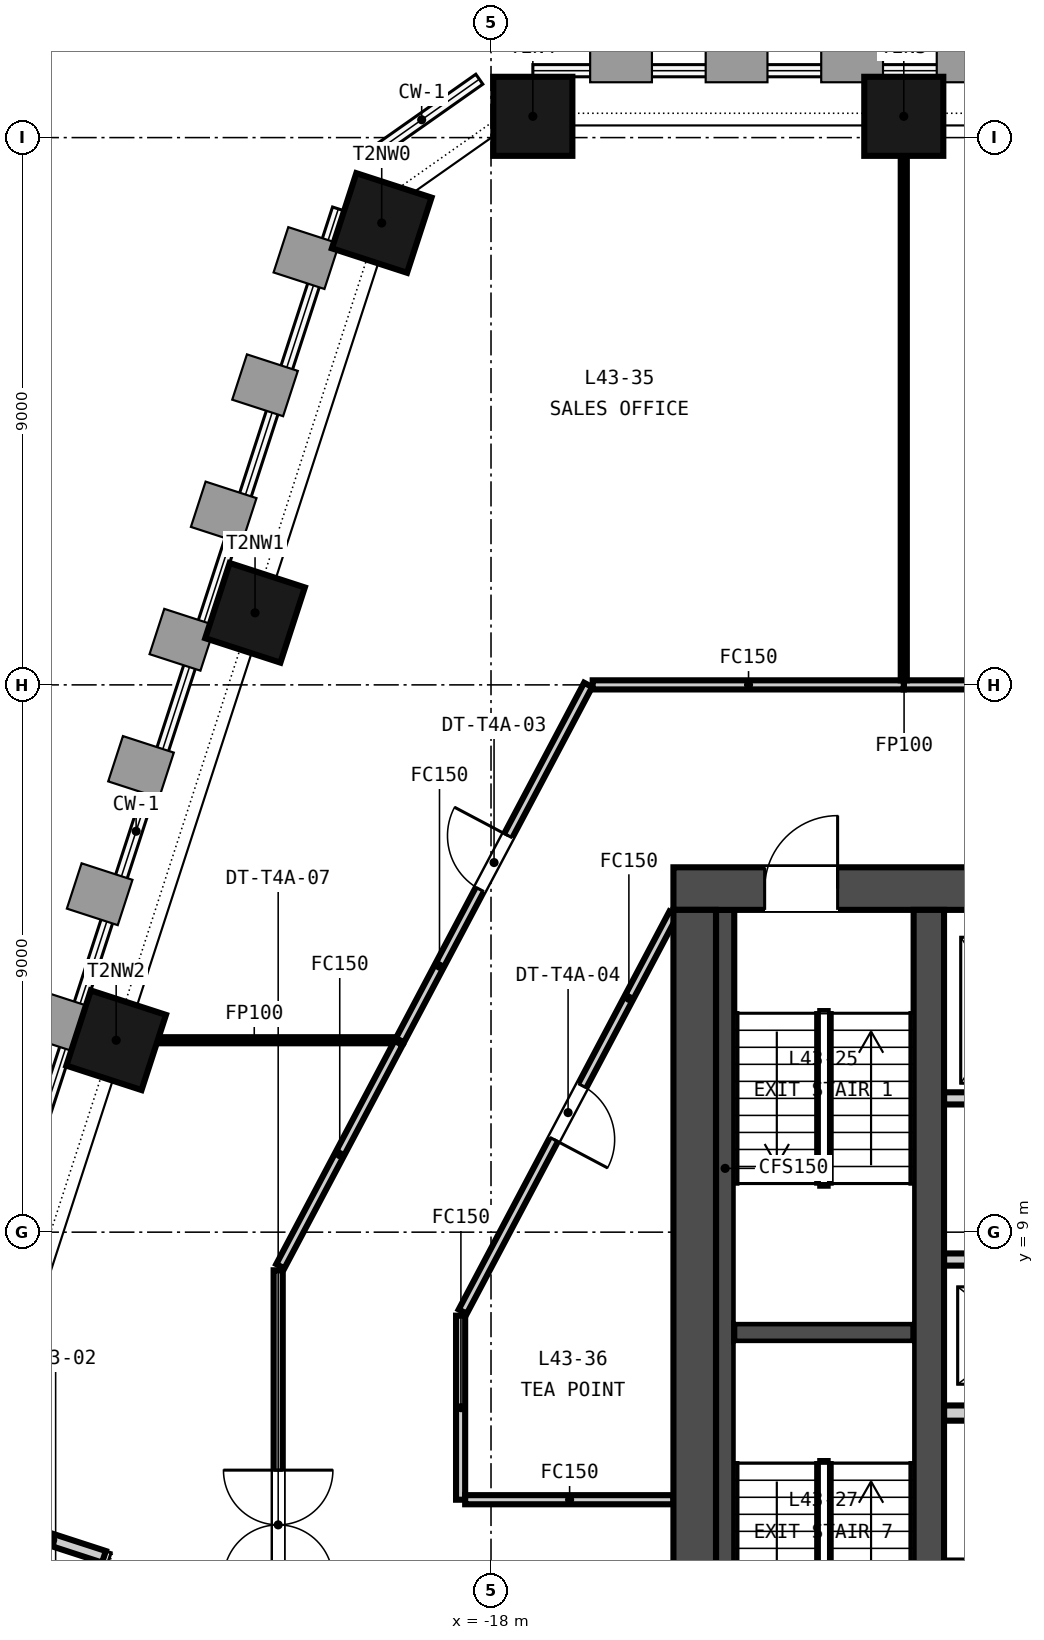
"""IFC4 building model, lengths in metres.
Left out: names, types, materials, properties, quantities, classifications, styles, units other than length and angle.
Written with IfcOpenShell. Run it as: python <this file> out.ifc"""

import sys

from ifc_helpers import new_model, si_unit, direction, frame, frame_2d, origin, origin_2d, place, context, subcontext, project, spatial, rectangle, extrude, element, fill, save


model = new_model("IFC4")
c1 = context("Model", 3, precision=1e-05, world=origin(), true_north=direction((0.0, 1.0)))
c2 = subcontext(c1, "Body", "Model", "MODEL_VIEW")
j1 = project(units=[si_unit("LENGTHUNIT", "METRE"), si_unit("PLANEANGLEUNIT", "RADIAN")], contexts=[c1])
p1 = place(None, origin())
s1 = spatial("IfcSite", under=j1, at=p1, CompositionType="ELEMENT")
p2 = place(p1, origin())
s2 = spatial("IfcBuilding", under=s1, at=p2, CompositionType="ELEMENT")
p3 = place(p2, frame((0.0, 0.0, 174.45)))
s3 = spatial("IfcBuildingStorey", under=s2, at=p3, CompositionType="ELEMENT", Elevation=174.45)
p4 = place(p3, frame((-15.0, 14.65, -0.15), z_axis=(0.0, 0.0, 1.0), x_axis=(1.0, 0.0, 0.0)))
e1 = element("IfcWall", 1, at=p4, inside=s3, PredefinedType="SOLIDWALL", context=c2, shape_type="SweptSolid", body=[
    extrude(rectangle(XDim=30.0, YDim=0.7, at=frame_2d((15.0, 0.0))), origin(), (0.0, 0.0, 1.0), 3.65),
])
p5 = place(p4, frame((9.25, 0.0, 0.15)))
e2 = element("IfcOpeningElement", 2, at=p5, cuts=e1, PredefinedType="OPENING", context=c2, shape_type="SweptSolid", body=[
    extrude(rectangle(XDim=1.5, YDim=2.1, at=frame_2d((0.75, 1.05))), frame((0.0, 0.36, 0.0), z_axis=(0.0, -1.0, 0.0), x_axis=(1.0, 0.0, 0.0)), (0.0, 0.0, 1.0), 0.72),
])
p6 = place(p4, frame((19.4, 0.0, 0.15)))
e3 = element("IfcOpeningElement", 3, at=p6, cuts=e1, PredefinedType="OPENING", context=c2, shape_type="SweptSolid", body=[
    extrude(rectangle(XDim=1.5, YDim=2.1, at=frame_2d((0.75, 1.05))), frame((0.0, 0.36, 0.0), z_axis=(0.0, -1.0, 0.0), x_axis=(1.0, 0.0, 0.0)), (0.0, 0.0, 1.0), 0.72),
])
p7 = place(p4, frame((1.5, 0.0, 0.15)))
e4 = element("IfcOpeningElement", 4, at=p7, cuts=e1, PredefinedType="OPENING", context=c2, shape_type="SweptSolid", body=[
    extrude(rectangle(XDim=1.2, YDim=2.1, at=frame_2d((0.6, 1.05))), frame((0.0, 0.36, 0.0), z_axis=(0.0, -1.0, 0.0), x_axis=(1.0, 0.0, 0.0)), (0.0, 0.0, 1.0), 0.72),
])
p8 = place(p4, frame((27.3, 0.0, 0.15)))
e5 = element("IfcOpeningElement", 5, at=p8, cuts=e1, PredefinedType="OPENING", context=c2, shape_type="SweptSolid", body=[
    extrude(rectangle(XDim=1.2, YDim=2.1, at=frame_2d((0.6, 1.05))), frame((0.0, 0.36, 0.0), z_axis=(0.0, -1.0, 0.0), x_axis=(1.0, 0.0, 0.0)), (0.0, 0.0, 1.0), 0.72),
])
p9 = place(p3, frame((-14.65, 0.7, -0.15), z_axis=(0.0, 0.0, 1.0), x_axis=(0.0, 1.0, 0.0)))
e6 = element("IfcWall", 6, at=p9, inside=s3, PredefinedType="SOLIDWALL", context=c2, shape_type="SweptSolid", body=[
    extrude(rectangle(XDim=13.6, YDim=0.7, at=frame_2d((6.8, 0.0))), origin(), (0.0, 0.0, 1.0), 3.65),
])
p10 = place(p3, frame((-10.8, 0.7, -0.15), z_axis=(0.0, 0.0, 1.0), x_axis=(0.0, 1.0, 0.0)))
e7 = element("IfcWall", 7, at=p10, inside=s3, PredefinedType="SOLIDWALL", context=c2, shape_type="SweptSolid", body=[
    extrude(rectangle(XDim=13.6, YDim=0.5, at=frame_2d((6.8, 0.0))), origin(), (0.0, 0.0, 1.0), 3.65),
])
for number, where, z_axis, x_axis in (
    (8, (-11.212, 27.35, -0.15), (0.0, 0.0, 1.0), (-1.0, 0.0, 0.0)),
    (9, (-17.312, 27.35, -0.15), (0.0, 0.0, 1.0), (-1.0, 0.0, 0.0)),
    (10, (-19.798, 25.596, -0.15), (0.0, 0.0, 1.0), (-0.309, -0.951, 0.0)),
    (11, (-21.881, 19.185, -0.15), (0.0, 0.0, 1.0), (-0.309, -0.951, 0.0)),
    (12, (-24.164, 12.156, -0.15), (0.0, 0.0, 1.0), (-0.309, -0.951, 0.0)),
):
    element("IfcColumn", number, at=place(p3, frame(where, z_axis=z_axis, x_axis=x_axis)), inside=s3, PredefinedType="COLUMN", context=c2, shape_type="SweptSolid", body=[
        extrude(rectangle(XDim=1.3, YDim=1.3, at=origin_2d()), origin(), (0.0, 0.0, 1.0), 3.65),
    ])
p11 = place(p3, frame((-26.062, 4.213, 0.0), z_axis=(0.0, 0.0, 1.0), x_axis=(0.951051165303, -0.309033462549, 0.0)))
e13 = element("IfcWall", 13, at=p11, inside=s3, PredefinedType="SOLIDWALL", context=c2, shape_type="SweptSolid", body=[
    extrude(rectangle(XDim=1.784, YDim=0.2, at=frame_2d((0.892, 0.0))), origin(), (0.0, 0.0, 1.0), 3.05),
])
p12 = place(p3, frame((-10.55, 6.025, 0.0), z_axis=(0.0, 0.0, 1.0), x_axis=(1.0, 0.0, 0.0)))
e14 = element("IfcWall", 14, at=p12, inside=s3, PredefinedType="PARTITIONING", context=c2, shape_type="SweptSolid", body=[
    extrude(rectangle(XDim=21.1, YDim=0.25, at=frame_2d((10.55, 0.0))), origin(), (0.0, 0.0, 1.0), 3.5),
])
p13 = place(p3, frame((-10.55, 8.55, 0.0), z_axis=(0.0, 0.0, 1.0), x_axis=(1.0, 0.0, 0.0)))
e15 = element("IfcWall", 15, at=p13, inside=s3, PredefinedType="PARTITIONING", context=c2, shape_type="SweptSolid", body=[
    extrude(rectangle(XDim=21.1, YDim=0.2, at=frame_2d((10.55, 0.0))), origin(), (0.0, 0.0, 1.0), 3.5),
])
p14 = place(p13, frame((0.675, 0.0, 0.0)))
e16 = element("IfcOpeningElement", 16, at=p14, cuts=e15, PredefinedType="OPENING", context=c2, shape_type="SweptSolid", body=[
    extrude(rectangle(XDim=1.2, YDim=2.1, at=frame_2d((0.6, 1.05))), frame((0.0, 0.11, 0.0), z_axis=(0.0, -1.0, 0.0), x_axis=(1.0, 0.0, 0.0)), (0.0, 0.0, 1.0), 0.22),
])
p15 = place(p13, frame((3.475, 0.0, 0.0)))
e17 = element("IfcOpeningElement", 17, at=p15, cuts=e15, PredefinedType="OPENING", context=c2, shape_type="SweptSolid", body=[
    extrude(rectangle(XDim=1.2, YDim=2.1, at=frame_2d((0.6, 1.05))), frame((0.0, 0.11, 0.0), z_axis=(0.0, -1.0, 0.0), x_axis=(1.0, 0.0, 0.0)), (0.0, 0.0, 1.0), 0.22),
])
p16 = place(p13, frame((6.275, 0.0, 0.0)))
e18 = element("IfcOpeningElement", 18, at=p16, cuts=e15, PredefinedType="OPENING", context=c2, shape_type="SweptSolid", body=[
    extrude(rectangle(XDim=1.2, YDim=2.1, at=frame_2d((0.6, 1.05))), frame((0.0, 0.11, 0.0), z_axis=(0.0, -1.0, 0.0), x_axis=(1.0, 0.0, 0.0)), (0.0, 0.0, 1.0), 0.22),
])
p17 = place(p13, frame((9.075, 0.0, 0.0)))
e19 = element("IfcOpeningElement", 19, at=p17, cuts=e15, PredefinedType="OPENING", context=c2, shape_type="SweptSolid", body=[
    extrude(rectangle(XDim=1.2, YDim=2.1, at=frame_2d((0.6, 1.05))), frame((0.0, 0.11, 0.0), z_axis=(0.0, -1.0, 0.0), x_axis=(1.0, 0.0, 0.0)), (0.0, 0.0, 1.0), 0.22),
])
p18 = place(p13, frame((11.875, 0.0, 0.0)))
e20 = element("IfcOpeningElement", 20, at=p18, cuts=e15, PredefinedType="OPENING", context=c2, shape_type="SweptSolid", body=[
    extrude(rectangle(XDim=1.2, YDim=2.1, at=frame_2d((0.6, 1.05))), frame((0.0, 0.11, 0.0), z_axis=(0.0, -1.0, 0.0), x_axis=(1.0, 0.0, 0.0)), (0.0, 0.0, 1.0), 0.22),
])
p19 = place(p13, frame((14.675, 0.0, 0.0)))
e21 = element("IfcOpeningElement", 21, at=p19, cuts=e15, PredefinedType="OPENING", context=c2, shape_type="SweptSolid", body=[
    extrude(rectangle(XDim=1.2, YDim=2.1, at=frame_2d((0.6, 1.05))), frame((0.0, 0.11, 0.0), z_axis=(0.0, -1.0, 0.0), x_axis=(1.0, 0.0, 0.0)), (0.0, 0.0, 1.0), 0.22),
])
p20 = place(p13, frame((17.475, 0.0, 0.0)))
e22 = element("IfcOpeningElement", 22, at=p20, cuts=e15, PredefinedType="OPENING", context=c2, shape_type="SweptSolid", body=[
    extrude(rectangle(XDim=1.2, YDim=2.1, at=frame_2d((0.6, 1.05))), frame((0.0, 0.11, 0.0), z_axis=(0.0, -1.0, 0.0), x_axis=(1.0, 0.0, 0.0)), (0.0, 0.0, 1.0), 0.22),
])
p21 = place(p13, frame((19.9, 0.0, 0.0)))
e23 = element("IfcOpeningElement", 23, at=p21, cuts=e15, PredefinedType="OPENING", context=c2, shape_type="SweptSolid", body=[
    extrude(rectangle(XDim=0.9, YDim=2.1, at=frame_2d((0.45, 1.05))), frame((0.0, 0.11, 0.0), z_axis=(0.0, -1.0, 0.0), x_axis=(1.0, 0.0, 0.0)), (0.0, 0.0, 1.0), 0.22),
])
p22 = place(p3, frame((-10.55, 11.2, 0.0), z_axis=(0.0, 0.0, 1.0), x_axis=(1.0, 0.0, 0.0)))
e24 = element("IfcWall", 24, at=p22, inside=s3, PredefinedType="PARTITIONING", context=c2, shape_type="SweptSolid", body=[
    extrude(rectangle(XDim=4.8, YDim=0.2, at=frame_2d((2.4, 0.0))), origin(), (0.0, 0.0, 1.0), 3.5),
])
p23 = place(p22, frame((0.525, 0.0, 0.0)))
e25 = element("IfcOpeningElement", 25, at=p23, cuts=e24, PredefinedType="OPENING", context=c2, shape_type="SweptSolid", body=[
    extrude(rectangle(XDim=1.1, YDim=2.1, at=frame_2d((0.55, 1.05))), frame((0.0, 0.11, 0.0), z_axis=(0.0, -1.0, 0.0), x_axis=(1.0, 0.0, 0.0)), (0.0, 0.0, 1.0), 0.22),
])
p24 = place(p22, frame((2.925, 0.0, 0.0)))
e26 = element("IfcOpeningElement", 26, at=p24, cuts=e24, PredefinedType="OPENING", context=c2, shape_type="SweptSolid", body=[
    extrude(rectangle(XDim=1.1, YDim=2.1, at=frame_2d((0.55, 1.05))), frame((0.0, 0.11, 0.0), z_axis=(0.0, -1.0, 0.0), x_axis=(1.0, 0.0, 0.0)), (0.0, 0.0, 1.0), 0.22),
])
p25 = place(p3, frame((-14.0, 7.35, 0.0), z_axis=(0.0, 0.0, 1.0), x_axis=(1.0, 0.0, 0.0)))
e27 = element("IfcWall", 27, at=p25, inside=s3, PredefinedType="SOLIDWALL", context=c2, shape_type="SweptSolid", body=[
    extrude(rectangle(XDim=2.95, YDim=0.3, at=frame_2d((1.475, 0.0))), origin(), (0.0, 0.0, 1.0), 3.5),
])
p26 = place(p3, frame((-14.15, 0.7, 0.0), z_axis=(0.0, 0.0, 1.0), x_axis=(0.0, 1.0, 0.0)))
e28 = element("IfcWall", 28, at=p26, inside=s3, PredefinedType="SOLIDWALL", context=c2, shape_type="SweptSolid", body=[
    extrude(rectangle(XDim=13.6, YDim=0.3, at=frame_2d((6.8, 0.0))), origin(), (0.0, 0.0, 1.0), 3.5),
])
p27 = place(p3, frame((-18.5, 7.627, 0.0), z_axis=(0.0, 0.0, 1.0), x_axis=(0.0, -1.0, 0.0)))
e29 = element("IfcWall", 29, at=p27, inside=s3, PredefinedType="PARTITIONING", context=c2, shape_type="SweptSolid", body=[
    extrude(rectangle(XDim=3.027, YDim=0.15, at=frame_2d((1.513, 0.0))), origin(), (0.0, 0.0, 1.0), 2.741),
])
p28 = place(p3, frame((-15.0, 14.239, 0.0), z_axis=(0.0, 0.0, 1.0), x_axis=(-0.467834708812, -0.88381597928, 0.0)))
e30 = element("IfcWall", 30, at=p28, inside=s3, PredefinedType="PARTITIONING", context=c2, shape_type="SweptSolid", body=[
    extrude(rectangle(XDim=7.406, YDim=0.15, at=frame_2d((3.703, 0.0))), origin(), (0.0, 0.0, 1.0), 2.741),
])
p29 = place(p28, frame((3.203, 0.0, 0.0)))
e31 = element("IfcOpeningElement", 31, at=p29, cuts=e30, PredefinedType="OPENING", context=c2, shape_type="SweptSolid", body=[
    extrude(rectangle(XDim=1.0, YDim=2.1, at=frame_2d((0.5, 1.05))), frame((0.0, 0.085, 0.0), z_axis=(0.0, -1.0, 0.0), x_axis=(1.0, 0.0, 0.0)), (0.0, 0.0, 1.0), 0.17),
])
p30 = place(p3, frame((-11.212, 18.0, 0.0), z_axis=(0.0, 0.0, 1.0), x_axis=(1.0, 0.0, 0.0)))
e32 = element("IfcWall", 32, at=p30, inside=s3, PredefinedType="PARTITIONING", context=c2, shape_type="SweptSolid", body=[
    extrude(rectangle(XDim=13.712, YDim=0.15, at=frame_2d((6.856, 0.0))), origin(), (0.0, 0.0, 1.0), 2.741),
])
p31 = place(p30, frame((6.356, 0.0, 0.0)))
e33 = element("IfcOpeningElement", 33, at=p31, cuts=e32, PredefinedType="OPENING", context=c2, shape_type="SweptSolid", body=[
    extrude(rectangle(XDim=1.0, YDim=2.1, at=frame_2d((0.5, 1.05))), frame((0.0, 0.085, 0.0), z_axis=(0.0, -1.0, 0.0), x_axis=(1.0, 0.0, 0.0)), (0.0, 0.0, 1.0), 0.17),
])
p32 = place(p3, frame((-19.497, 12.156, 0.0), z_axis=(0.0, 0.0, 1.0), x_axis=(0.467901291368, 0.883780731593, 0.0)))
e34 = element("IfcWall", 34, at=p32, inside=s3, PredefinedType="PARTITIONING", context=c2, shape_type="SweptSolid", body=[
    extrude(rectangle(XDim=6.613, YDim=0.15, at=frame_2d((3.306, 0.0))), origin(), (0.0, 0.0, 1.0), 2.741),
])
p33 = place(p32, frame((2.806, 0.0, 0.0)))
e35 = element("IfcOpeningElement", 35, at=p33, cuts=e34, PredefinedType="OPENING", context=c2, shape_type="SweptSolid", body=[
    extrude(rectangle(XDim=1.0, YDim=2.1, at=frame_2d((0.5, 1.05))), frame((0.0, 0.085, 0.0), z_axis=(0.0, -1.0, 0.0), x_axis=(1.0, 0.0, 0.0)), (0.0, 0.0, 1.0), 0.17),
])
p34 = place(p3, frame((-16.328, 18.0, 0.0), z_axis=(0.0, 0.0, 1.0), x_axis=(1.0, 0.0, 0.0)))
e36 = element("IfcWall", 36, at=p34, inside=s3, PredefinedType="PARTITIONING", context=c2, shape_type="SweptSolid", body=[
    extrude(rectangle(XDim=5.116, YDim=0.15, at=frame_2d((2.558, 0.0))), origin(), (0.0, 0.0, 1.0), 2.741),
])
p35 = place(p3, frame((-11.212, 18.075, 0.0), z_axis=(0.0, 0.0, 1.0), x_axis=(0.0, 1.0, 0.0)))
e37 = element("IfcWall", 37, at=p35, inside=s3, PredefinedType="PARTITIONING", context=c2, shape_type="SweptSolid", body=[
    extrude(rectangle(XDim=9.325, YDim=0.1, at=frame_2d((4.663, 0.0))), origin(), (0.0, 0.0, 1.0), 2.741),
])
p36 = place(p3, frame((-24.217, 12.156, 0.0), z_axis=(0.0, 0.0, 1.0), x_axis=(1.0, 0.0, 0.0)))
e38 = element("IfcWall", 38, at=p36, inside=s3, PredefinedType="PARTITIONING", context=c2, shape_type="SweptSolid", body=[
    extrude(rectangle(XDim=4.637, YDim=0.1, at=frame_2d((2.318, 0.0))), origin(), (0.0, 0.0, 1.0), 2.741),
])
p37 = place(p3, frame((-18.425, 4.6, 0.0), z_axis=(0.0, 0.0, 1.0), x_axis=(1.0, 0.0, 0.0)))
e39 = element("IfcWall", 39, at=p37, inside=s3, PredefinedType="PARTITIONING", context=c2, shape_type="SweptSolid", body=[
    extrude(rectangle(XDim=3.425, YDim=0.15, at=frame_2d((1.712, 0.0))), origin(), (0.0, 0.0, 1.0), 2.741),
])
p38 = place(p3, frame((-21.5, 0.0, 0.0), z_axis=(0.0, 0.0, 1.0), x_axis=(0.0, 1.0, 0.0)))
e40 = element("IfcWall", 40, at=p38, inside=s3, PredefinedType="PARTITIONING", context=c2, shape_type="SweptSolid", body=[
    extrude(rectangle(XDim=8.373, YDim=0.15, at=frame_2d((4.187, 0.0))), origin(), (0.0, 0.0, 1.0), 2.741),
])
p39 = place(p38, frame((3.287, 0.0, 0.0)))
e41 = element("IfcOpeningElement", 41, at=p39, cuts=e40, PredefinedType="OPENING", context=c2, shape_type="SweptSolid", body=[
    extrude(rectangle(XDim=1.8, YDim=2.1, at=frame_2d((0.9, 1.05))), frame((0.0, 0.085, 0.0), z_axis=(0.0, -1.0, 0.0), x_axis=(1.0, 0.0, 0.0)), (0.0, 0.0, 1.0), 0.17),
])
p40 = place(p3, frame((-21.465, 8.439, 0.0), z_axis=(0.0, 0.0, 1.0), x_axis=(0.467890419772, 0.883786487272, 0.0)))
e42 = element("IfcWall", 42, at=p40, inside=s3, PredefinedType="PARTITIONING", context=c2, shape_type="SweptSolid", body=[
    extrude(rectangle(XDim=4.156, YDim=0.15, at=frame_2d((2.078, 0.0))), origin(), (0.0, 0.0, 1.0), 2.741),
])
p41 = place(p7, origin())
e43 = element("IfcDoor", 43, at=p41, inside=s3, OperationType="SINGLE_SWING_RIGHT", PredefinedType="DOOR", context=c2, shape_type="SweptSolid", body=[
    extrude(rectangle(XDim=1.2, YDim=2.1, at=frame_2d((0.6, 1.05))), frame((0.0, 0.025, 0.0), z_axis=(0.0, -1.0, 0.0), x_axis=(1.0, 0.0, 0.0)), (0.0, 0.0, 1.0), 0.05),
])
fill(e4, e43)
p42 = place(p33, origin())
e44 = element("IfcDoor", 44, at=p42, inside=s3, OperationType="SINGLE_SWING_RIGHT", PredefinedType="DOOR", context=c2, shape_type="SweptSolid", body=[
    extrude(rectangle(XDim=1.0, YDim=2.1, at=frame_2d((0.5, 1.05))), frame((0.0, 0.025, 0.0), z_axis=(0.0, -1.0, 0.0), x_axis=(1.0, 0.0, 0.0)), (0.0, 0.0, 1.0), 0.05),
])
fill(e35, e44)
p43 = place(p29, origin())
e45 = element("IfcDoor", 45, at=p43, inside=s3, OperationType="SINGLE_SWING_RIGHT", PredefinedType="DOOR", context=c2, shape_type="SweptSolid", body=[
    extrude(rectangle(XDim=1.0, YDim=2.1, at=frame_2d((0.5, 1.05))), frame((0.0, 0.025, 0.0), z_axis=(0.0, -1.0, 0.0), x_axis=(1.0, 0.0, 0.0)), (0.0, 0.0, 1.0), 0.05),
])
fill(e31, e45)
p44 = place(p39, origin())
e46 = element("IfcDoor", 46, at=p44, inside=s3, OperationType="DOUBLE_DOOR_DOUBLE_SWING", PredefinedType="DOOR", context=c2, shape_type="SweptSolid", body=[
    extrude(rectangle(XDim=1.8, YDim=2.1, at=frame_2d((0.9, 1.05))), frame((0.0, 0.025, 0.0), z_axis=(0.0, -1.0, 0.0), x_axis=(1.0, 0.0, 0.0)), (0.0, 0.0, 1.0), 0.05),
])
fill(e41, e46)
save(model, sys.argv[1])
